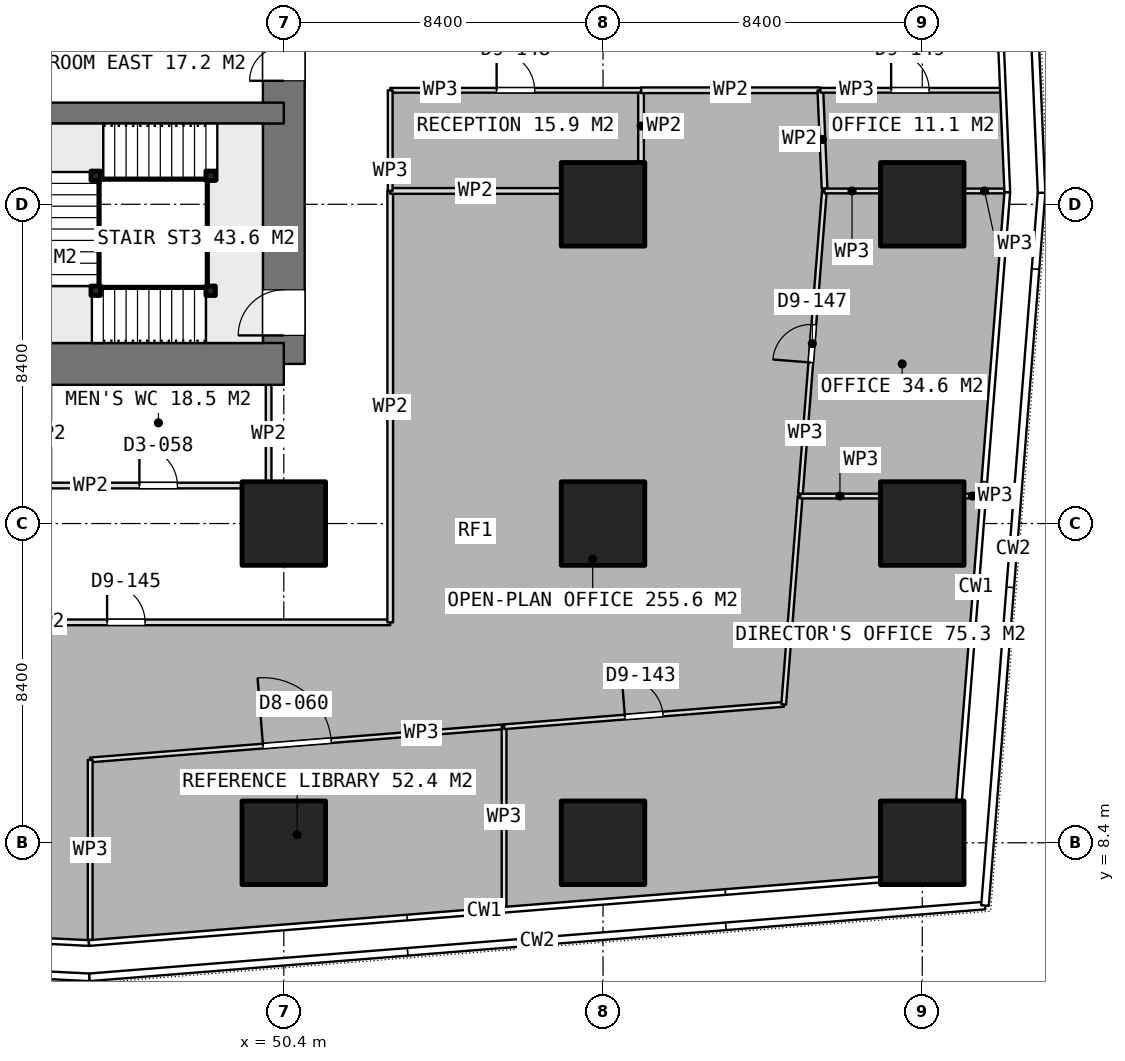
"""IFC4 building model, lengths in metres.
Left out: names, types, materials, properties, quantities, classifications, styles, units other than length and angle.
Written with IfcOpenShell. Run it as: python <this file> out.ifc"""

import sys

from ifc_helpers import new_model, si_unit, direction, frame, frame_2d, origin, origin_2d, place, context, subcontext, project, spatial, rectangle, extrude, element, fill, save


model = new_model("IFC4")
c1 = context("Model", 3, precision=1e-05, world=origin(), true_north=direction((0.0, 1.0)))
c2 = subcontext(c1, "Body", "Model", "MODEL_VIEW")
j1 = project(units=[si_unit("LENGTHUNIT", "METRE"), si_unit("PLANEANGLEUNIT", "RADIAN")], contexts=[c1])
p1 = place(None, origin())
s1 = spatial("IfcSite", under=j1, at=p1, CompositionType="ELEMENT")
p2 = place(p1, origin())
s2 = spatial("IfcBuilding", under=s1, at=p2, CompositionType="ELEMENT")
p3 = place(p2, frame((0.0, 0.0, 51.65)))
s3 = spatial("IfcBuildingStorey", under=s2, at=p3, CompositionType="ELEMENT", Elevation=51.65)
p4 = place(p3, frame((40.0, 21.0, 0.0), z_axis=(0.0, 0.0, 1.0), x_axis=(1.0, 0.0, 0.0)))
e1 = element("IfcWall", 1, at=p4, inside=s3, PredefinedType="SHEAR", context=c2, shape_type="SweptSolid", body=[
    extrude(rectangle(XDim=10.4, YDim=1.1, at=frame_2d((5.2, 0.0))), origin(), (0.0, 0.0, 1.0), 3.75),
])
p5 = place(p3, frame((50.4, 21.0, 0.0), z_axis=(0.0, 0.0, 1.0), x_axis=(0.0, 1.0, 0.0)))
e2 = element("IfcWall", 2, at=p5, inside=s3, PredefinedType="SHEAR", context=c2, shape_type="SweptSolid", body=[
    extrude(rectangle(XDim=25.2, YDim=1.1, at=frame_2d((12.6, 0.0))), origin(), (0.0, 0.0, 1.0), 3.75),
])
p6 = place(p5, frame((16.2, 0.0, 0.0)))
e3 = element("IfcOpeningElement", 3, at=p6, cuts=e2, PredefinedType="OPENING", context=c2, shape_type="SweptSolid", body=[
    extrude(rectangle(XDim=1.2, YDim=2.1, at=frame_2d((0.6, 1.05))), frame((0.0, 0.56, 0.0), z_axis=(0.0, -1.0, 0.0), x_axis=(1.0, 0.0, 0.0)), (0.0, 0.0, 1.0), 1.12),
])
p7 = place(p5, frame((10.05, 0.0, 0.0)))
e4 = element("IfcOpeningElement", 4, at=p7, cuts=e2, PredefinedType="OPENING", context=c2, shape_type="SweptSolid", body=[
    extrude(rectangle(XDim=0.9, YDim=2.1, at=frame_2d((0.45, 1.05))), frame((0.0, 0.56, 0.0), z_axis=(0.0, -1.0, 0.0), x_axis=(1.0, 0.0, 0.0)), (0.0, 0.0, 1.0), 1.12),
])
p8 = place(p5, frame((7.45, 0.0, 0.0)))
e5 = element("IfcOpeningElement", 5, at=p8, cuts=e2, PredefinedType="OPENING", context=c2, shape_type="SweptSolid", body=[
    extrude(rectangle(XDim=0.9, YDim=2.1, at=frame_2d((0.45, 1.05))), frame((0.0, 0.56, 0.0), z_axis=(0.0, -1.0, 0.0), x_axis=(1.0, 0.0, 0.0)), (0.0, 0.0, 1.0), 1.12),
])
p9 = place(p5, frame((0.75, 0.0, 0.0)))
e6 = element("IfcOpeningElement", 6, at=p9, cuts=e2, PredefinedType="OPENING", context=c2, shape_type="SweptSolid", body=[
    extrude(rectangle(XDim=1.2, YDim=2.1, at=frame_2d((0.6, 1.05))), frame((0.0, 0.56, 0.0), z_axis=(0.0, -1.0, 0.0), x_axis=(1.0, 0.0, 0.0)), (0.0, 0.0, 1.0), 1.12),
])
p10 = place(p3, frame((43.8, 27.6, 0.0), z_axis=(0.0, 0.0, 1.0), x_axis=(1.0, 0.0, 0.0)))
e7 = element("IfcWall", 7, at=p10, inside=s3, PredefinedType="SHEAR", context=c2, shape_type="SweptSolid", body=[
    extrude(rectangle(XDim=6.6, YDim=0.55, at=frame_2d((3.3, 0.0))), origin(), (0.0, 0.0, 1.0), 3.75),
])
for number, where, z_axis, x_axis in (
    (8, (50.4, 8.4, 0.0), (0.0, 0.0, 1.0), (1.0, 0.0, 0.0)),
    (9, (50.4, 16.8, 0.0), (0.0, 0.0, 1.0), (1.0, 0.0, 0.0)),
    (10, (58.8, 8.4, 0.0), (0.0, 0.0, 1.0), (1.0, 0.0, 0.0)),
    (11, (58.8, 16.8, 0.0), (0.0, 0.0, 1.0), (1.0, 0.0, 0.0)),
    (12, (58.8, 25.2, 0.0), (0.0, 0.0, 1.0), (1.0, 0.0, 0.0)),
    (13, (67.2, 8.4, 0.0), (0.0, 0.0, 1.0), (1.0, 0.0, 0.0)),
    (14, (67.2, 16.8, 0.0), (0.0, 0.0, 1.0), (1.0, 0.0, 0.0)),
    (15, (67.2, 25.2, 0.0), (0.0, 0.0, 1.0), (1.0, 0.0, 0.0)),
):
    element("IfcColumn", number, at=place(p3, frame(where, z_axis=z_axis, x_axis=x_axis)), inside=s3, PredefinedType="COLUMN", context=c2, shape_type="SweptSolid", body=[
        extrude(rectangle(XDim=2.2, YDim=2.2, at=origin_2d()), origin(), (0.0, 0.0, 1.0), 3.75),
    ])
p11 = place(p3, frame((44.125, 17.8, 0.0), z_axis=(0.0, 0.0, 1.0), x_axis=(1.0, 0.0, 0.0)))
e16 = element("IfcWall", 16, at=p11, inside=s3, PredefinedType="PARTITIONING", context=c2, shape_type="SweptSolid", body=[
    extrude(rectangle(XDim=5.95, YDim=0.15, at=frame_2d((2.975, 0.0))), origin(), (0.0, 0.0, 1.0), 3.5),
])
p12 = place(p11, frame((2.475, 0.0, 0.0)))
e17 = element("IfcOpeningElement", 17, at=p12, cuts=e16, PredefinedType="OPENING", context=c2, shape_type="SweptSolid", body=[
    extrude(rectangle(XDim=1.0, YDim=2.1, at=frame_2d((0.5, 1.05))), frame((0.0, 0.085, 0.0), z_axis=(0.0, -1.0, 0.0), x_axis=(1.0, 0.0, 0.0)), (0.0, 0.0, 1.0), 0.17),
])
p13 = place(p3, frame((50.0, 17.875, 0.0), z_axis=(0.0, 0.0, 1.0), x_axis=(0.0, 1.0, 0.0)))
e18 = element("IfcWall", 18, at=p13, inside=s3, PredefinedType="PARTITIONING", context=c2, shape_type="SweptSolid", body=[
    extrude(rectangle(XDim=2.575, YDim=0.15, at=frame_2d((1.288, 0.0))), origin(), (0.0, 0.0, 1.0), 3.5),
])
p14 = place(p3, frame((45.305, 10.58, 0.0), z_axis=(0.0, 0.0, 1.0), x_axis=(0.99680425646, 0.079882878656, 0.0)))
e19 = element("IfcWall", 19, at=p14, inside=s3, PredefinedType="PARTITIONING", context=c2, shape_type="SweptSolid", body=[
    extrude(rectangle(XDim=10.926, YDim=0.125, at=frame_2d((5.463, 0.0))), origin(), (0.0, 0.0, 1.0), 3.5),
])
p15 = place(p14, frame((4.563, 0.0, 0.0)))
e20 = element("IfcOpeningElement", 20, at=p15, cuts=e19, PredefinedType="OPENING", context=c2, shape_type="SweptSolid", body=[
    extrude(rectangle(XDim=1.8, YDim=2.1, at=frame_2d((0.9, 1.05))), frame((0.0, 0.073, 0.0), z_axis=(0.0, -1.0, 0.0), x_axis=(1.0, 0.0, 0.0)), (0.0, 0.0, 1.0), 0.145),
])
p16 = place(p3, frame((56.196, 11.453, 0.0), z_axis=(0.0, 0.0, 1.0), x_axis=(0.0, -1.0, 0.0)))
e21 = element("IfcWall", 21, at=p16, inside=s3, PredefinedType="PARTITIONING", context=c2, shape_type="SweptSolid", body=[
    extrude(rectangle(XDim=4.736, YDim=0.125, at=frame_2d((2.368, 0.0))), origin(), (0.0, 0.0, 1.0), 3.5),
])
p17 = place(p3, frame((45.305, 5.845, 0.0), z_axis=(0.0, 0.0, 1.0), x_axis=(0.0, 1.0, 0.0)))
e22 = element("IfcWall", 22, at=p17, inside=s3, PredefinedType="PARTITIONING", context=c2, shape_type="SweptSolid", body=[
    extrude(rectangle(XDim=4.735, YDim=0.125, at=frame_2d((2.368, 0.0))), origin(), (0.0, 0.0, 1.0), 3.5),
])
p18 = place(p3, frame((56.197, 11.453, 0.0), z_axis=(0.0, 0.0, 1.0), x_axis=(0.996809280439, 0.079820163062, 0.0)))
e23 = element("IfcWall", 23, at=p18, inside=s3, PredefinedType="PARTITIONING", context=c2, shape_type="SweptSolid", body=[
    extrude(rectangle(XDim=7.38, YDim=0.125, at=frame_2d((3.69, 0.0))), origin(), (0.0, 0.0, 1.0), 3.5),
])
p19 = place(p18, frame((3.19, 0.0, 0.0)))
e24 = element("IfcOpeningElement", 24, at=p19, cuts=e23, PredefinedType="OPENING", context=c2, shape_type="SweptSolid", body=[
    extrude(rectangle(XDim=1.0, YDim=2.1, at=frame_2d((0.5, 1.05))), frame((0.0, 0.073, 0.0), z_axis=(0.0, -1.0, 0.0), x_axis=(1.0, 0.0, 0.0)), (0.0, 0.0, 1.0), 0.145),
])
p20 = place(p3, frame((63.554, 12.042, 0.0), z_axis=(0.0, 0.0, 1.0), x_axis=(0.078951000854, 0.996878497844, 0.0)))
e25 = element("IfcWall", 25, at=p20, inside=s3, PredefinedType="PARTITIONING", context=c2, shape_type="SweptSolid", body=[
    extrude(rectangle(XDim=5.498, YDim=0.125, at=frame_2d((2.749, 0.0))), origin(), (0.0, 0.0, 1.0), 3.5),
])
p21 = place(p3, frame((63.988, 17.523, 0.0), z_axis=(0.0, 0.0, 1.0), x_axis=(1.0, 0.0, 0.0)))
e26 = element("IfcWall", 26, at=p21, inside=s3, PredefinedType="PARTITIONING", context=c2, shape_type="SweptSolid", body=[
    extrude(rectangle(XDim=2.092, YDim=0.125, at=frame_2d((1.046, 0.0))), origin(), (0.0, 0.0, 1.0), 3.5),
])
p22 = place(p3, frame((68.32, 17.523, 0.0), z_axis=(0.0, 0.0, 1.0), x_axis=(1.0, 0.0, 0.0)))
e27 = element("IfcWall", 27, at=p22, inside=s3, PredefinedType="PARTITIONING", context=c2, shape_type="SweptSolid", body=[
    extrude(rectangle(XDim=0.403, YDim=0.125, at=frame_2d((0.201, 0.0))), origin(), (0.0, 0.0, 1.0), 3.5),
])
p23 = place(p3, frame((63.994, 17.585, 0.0), z_axis=(0.0, 0.0, 1.0), x_axis=(0.07897654499, 0.996876474465, 0.0)))
e28 = element("IfcWall", 28, at=p23, inside=s3, PredefinedType="PARTITIONING", context=c2, shape_type="SweptSolid", body=[
    extrude(rectangle(XDim=7.991, YDim=0.125, at=frame_2d((3.996, 0.0))), origin(), (0.0, 0.0, 1.0), 3.5),
])
p24 = place(p23, frame((3.463, 0.0, 0.0)))
e29 = element("IfcOpeningElement", 29, at=p24, cuts=e28, PredefinedType="OPENING", context=c2, shape_type="SweptSolid", body=[
    extrude(rectangle(XDim=1.0, YDim=2.1, at=frame_2d((0.5, 1.05))), frame((0.0, 0.073, 0.0), z_axis=(0.0, -1.0, 0.0), x_axis=(1.0, 0.0, 0.0)), (0.0, 0.0, 1.0), 0.145),
])
p25 = place(p3, frame((64.625, 25.551, 0.0), z_axis=(0.0, 0.0, 1.0), x_axis=(1.0, 0.0, 0.0)))
e30 = element("IfcWall", 30, at=p25, inside=s3, PredefinedType="PARTITIONING", context=c2, shape_type="SweptSolid", body=[
    extrude(rectangle(XDim=1.455, YDim=0.125, at=frame_2d((0.728, 0.0))), origin(), (0.0, 0.0, 1.0), 3.5),
])
p26 = place(p3, frame((68.32, 25.551, 0.0), z_axis=(0.0, 0.0, 1.0), x_axis=(1.0, 0.0, 0.0)))
e31 = element("IfcWall", 31, at=p26, inside=s3, PredefinedType="PARTITIONING", context=c2, shape_type="SweptSolid", body=[
    extrude(rectangle(XDim=1.037, YDim=0.125, at=frame_2d((0.519, 0.0))), origin(), (0.0, 0.0, 1.0), 3.5),
])
p27 = place(p3, frame((39.3, 14.2, 0.0), z_axis=(0.0, 0.0, 1.0), x_axis=(1.0, 0.0, 0.0)))
e32 = element("IfcWall", 32, at=p27, inside=s3, PredefinedType="PARTITIONING", context=c2, shape_type="SweptSolid", body=[
    extrude(rectangle(XDim=13.9, YDim=0.15, at=frame_2d((6.95, 0.0))), origin(), (0.0, 0.0, 1.0), 3.5),
])
p28 = place(p27, frame((6.45, 0.0, 0.0)))
e33 = element("IfcOpeningElement", 33, at=p28, cuts=e32, PredefinedType="OPENING", context=c2, shape_type="SweptSolid", body=[
    extrude(rectangle(XDim=1.0, YDim=2.1, at=frame_2d((0.5, 1.05))), frame((0.0, 0.085, 0.0), z_axis=(0.0, -1.0, 0.0), x_axis=(1.0, 0.0, 0.0)), (0.0, 0.0, 1.0), 0.17),
])
p29 = place(p3, frame((53.2, 14.2, 0.0), z_axis=(0.0, 0.0, 1.0), x_axis=(0.0, 1.0, 0.0)))
e34 = element("IfcWall", 34, at=p29, inside=s3, PredefinedType="PARTITIONING", context=c2, shape_type="SweptSolid", body=[
    extrude(rectangle(XDim=11.352, YDim=0.15, at=frame_2d((5.676, 0.0))), origin(), (0.0, 0.0, 1.0), 3.5),
])
p30 = place(p3, frame((53.2, 25.552, 0.0), z_axis=(0.0, 0.0, 1.0), x_axis=(1.0, 0.0, 0.0)))
e35 = element("IfcWall", 35, at=p30, inside=s3, PredefinedType="PARTITIONING", context=c2, shape_type="SweptSolid", body=[
    extrude(rectangle(XDim=4.48, YDim=0.15, at=frame_2d((2.24, 0.0))), origin(), (0.0, 0.0, 1.0), 3.5),
])
p31 = place(p3, frame((59.8, 26.32, 0.0), z_axis=(0.0, 0.0, 1.0), x_axis=(0.0, 1.0, 0.0)))
e36 = element("IfcWall", 36, at=p31, inside=s3, PredefinedType="PARTITIONING", context=c2, shape_type="SweptSolid", body=[
    extrude(rectangle(XDim=1.88, YDim=0.15, at=frame_2d((0.94, 0.0))), origin(), (0.0, 0.0, 1.0), 3.5),
])
p32 = place(p3, frame((59.8, 28.2, 0.0), z_axis=(0.0, 0.0, 1.0), x_axis=(1.0, 0.0, 0.0)))
e37 = element("IfcWall", 37, at=p32, inside=s3, PredefinedType="PARTITIONING", context=c2, shape_type="SweptSolid", body=[
    extrude(rectangle(XDim=4.719, YDim=0.15, at=frame_2d((2.359, 0.0))), origin(), (0.0, 0.0, 1.0), 3.5),
])
p33 = place(p3, frame((64.519, 28.2, 0.0), z_axis=(0.0, 0.0, 1.0), x_axis=(0.042430609407, -0.999099416167, 0.0)))
e38 = element("IfcWall", 38, at=p33, inside=s3, PredefinedType="PARTITIONING", context=c2, shape_type="SweptSolid", body=[
    extrude(rectangle(XDim=2.589, YDim=0.15, at=frame_2d((1.295, 0.0))), origin(), (0.0, 0.0, 1.0), 3.5),
])
p34 = place(p3, frame((64.519, 28.2, 0.0), z_axis=(0.0, 0.0, 1.0), x_axis=(1.0, 0.0, 0.0)))
e39 = element("IfcWall", 39, at=p34, inside=s3, PredefinedType="PARTITIONING", context=c2, shape_type="SweptSolid", body=[
    extrude(rectangle(XDim=4.755, YDim=0.125, at=frame_2d((2.377, 0.0))), origin(), (0.0, 0.0, 1.0), 3.5),
])
p35 = place(p34, frame((1.862, 0.0, 0.0)))
e40 = element("IfcOpeningElement", 40, at=p35, cuts=e39, PredefinedType="OPENING", context=c2, shape_type="SweptSolid", body=[
    extrude(rectangle(XDim=1.0, YDim=2.1, at=frame_2d((0.5, 1.05))), frame((0.0, 0.073, 0.0), z_axis=(0.0, -1.0, 0.0), x_axis=(1.0, 0.0, 0.0)), (0.0, 0.0, 1.0), 0.145),
])
p36 = place(p3, frame((53.2, 28.2, 0.0), z_axis=(0.0, 0.0, 1.0), x_axis=(1.0, 0.0, 0.0)))
e41 = element("IfcWall", 41, at=p36, inside=s3, PredefinedType="PARTITIONING", context=c2, shape_type="SweptSolid", body=[
    extrude(rectangle(XDim=6.6, YDim=0.125, at=frame_2d((3.3, 0.0))), origin(), (0.0, 0.0, 1.0), 3.5),
])
p37 = place(p36, frame((2.8, 0.0, 0.0)))
e42 = element("IfcOpeningElement", 42, at=p37, cuts=e41, PredefinedType="OPENING", context=c2, shape_type="SweptSolid", body=[
    extrude(rectangle(XDim=1.0, YDim=2.1, at=frame_2d((0.5, 1.05))), frame((0.0, 0.073, 0.0), z_axis=(0.0, -1.0, 0.0), x_axis=(1.0, 0.0, 0.0)), (0.0, 0.0, 1.0), 0.145),
])
p38 = place(p3, frame((53.2, 25.552, 0.0), z_axis=(0.0, 0.0, 1.0), x_axis=(0.0, 1.0, 0.0)))
e43 = element("IfcWall", 43, at=p38, inside=s3, PredefinedType="PARTITIONING", context=c2, shape_type="SweptSolid", body=[
    extrude(rectangle(XDim=2.648, YDim=0.125, at=frame_2d((1.324, 0.0))), origin(), (0.0, 0.0, 1.0), 3.5),
])
for number, where, z_axis, x_axis in (
    (44, (48.475, 22.925, 0.0), (0.0, 0.0, 1.0), (1.0, 0.0, 0.0)),
    (45, (45.45, 22.925, 0.0), (0.0, 0.0, 1.0), (1.0, 0.0, 0.0)),
    (46, (45.45, 25.95, 0.0), (0.0, 0.0, 1.0), (1.0, 0.0, 0.0)),
    (47, (48.475, 25.95, 0.0), (0.0, 0.0, 1.0), (1.0, 0.0, 0.0)),
):
    element("IfcColumn", number, at=place(p3, frame(where, z_axis=z_axis, x_axis=x_axis)), inside=s3, PredefinedType="COLUMN", context=c2, shape_type="SweptSolid", body=[
        extrude(rectangle(XDim=0.25, YDim=0.25, at=origin_2d()), origin(), (0.0, 0.0, 1.0), 3.75),
    ])
p39 = place(p8, origin())
e48 = element("IfcDoor", 48, at=p39, inside=s3, OperationType="SINGLE_SWING_LEFT", PredefinedType="DOOR", context=c2, shape_type="SweptSolid", body=[
    extrude(rectangle(XDim=0.9, YDim=2.1, at=frame_2d((0.45, 1.05))), frame((0.0, 0.025, 0.0), z_axis=(0.0, -1.0, 0.0), x_axis=(1.0, 0.0, 0.0)), (0.0, 0.0, 1.0), 0.05),
])
fill(e5, e48)
p40 = place(p12, origin())
e49 = element("IfcDoor", 49, at=p40, inside=s3, OperationType="SINGLE_SWING_LEFT", PredefinedType="DOOR", context=c2, shape_type="SweptSolid", body=[
    extrude(rectangle(XDim=1.0, YDim=2.1, at=frame_2d((0.5, 1.05))), frame((0.0, 0.025, 0.0), z_axis=(0.0, -1.0, 0.0), x_axis=(1.0, 0.0, 0.0)), (0.0, 0.0, 1.0), 0.05),
])
fill(e17, e49)
p41 = place(p15, origin())
e50 = element("IfcDoor", 50, at=p41, inside=s3, OperationType="DOUBLE_DOOR_SINGLE_SWING", PredefinedType="DOOR", context=c2, shape_type="SweptSolid", body=[
    extrude(rectangle(XDim=1.8, YDim=2.1, at=frame_2d((0.9, 1.05))), frame((0.0, 0.025, 0.0), z_axis=(0.0, -1.0, 0.0), x_axis=(1.0, 0.0, 0.0)), (0.0, 0.0, 1.0), 0.05),
])
fill(e20, e50)
p42 = place(p19, origin())
e51 = element("IfcDoor", 51, at=p42, inside=s3, OperationType="SINGLE_SWING_LEFT", PredefinedType="DOOR", context=c2, shape_type="SweptSolid", body=[
    extrude(rectangle(XDim=1.0, YDim=2.1, at=frame_2d((0.5, 1.05))), frame((0.0, 0.025, 0.0), z_axis=(0.0, -1.0, 0.0), x_axis=(1.0, 0.0, 0.0)), (0.0, 0.0, 1.0), 0.05),
])
fill(e24, e51)
p43 = place(p24, origin())
e52 = element("IfcDoor", 52, at=p43, inside=s3, OperationType="SINGLE_SWING_LEFT", PredefinedType="DOOR", context=c2, shape_type="SweptSolid", body=[
    extrude(rectangle(XDim=1.0, YDim=2.1, at=frame_2d((0.5, 1.05))), frame((0.0, 0.025, 0.0), z_axis=(0.0, -1.0, 0.0), x_axis=(1.0, 0.0, 0.0)), (0.0, 0.0, 1.0), 0.05),
])
fill(e29, e52)
p44 = place(p28, origin())
e53 = element("IfcDoor", 53, at=p44, inside=s3, OperationType="SINGLE_SWING_LEFT", PredefinedType="DOOR", context=c2, shape_type="SweptSolid", body=[
    extrude(rectangle(XDim=1.0, YDim=2.1, at=frame_2d((0.5, 1.05))), frame((0.0, 0.025, 0.0), z_axis=(0.0, -1.0, 0.0), x_axis=(1.0, 0.0, 0.0)), (0.0, 0.0, 1.0), 0.05),
])
fill(e33, e53)
p45 = place(p35, origin())
e54 = element("IfcDoor", 54, at=p45, inside=s3, OperationType="SINGLE_SWING_LEFT", PredefinedType="DOOR", context=c2, shape_type="SweptSolid", body=[
    extrude(rectangle(XDim=1.0, YDim=2.1, at=frame_2d((0.5, 1.05))), frame((0.0, 0.025, 0.0), z_axis=(0.0, -1.0, 0.0), x_axis=(1.0, 0.0, 0.0)), (0.0, 0.0, 1.0), 0.05),
])
fill(e40, e54)
p46 = place(p37, origin())
e55 = element("IfcDoor", 55, at=p46, inside=s3, OperationType="SINGLE_SWING_LEFT", PredefinedType="DOOR", context=c2, shape_type="SweptSolid", body=[
    extrude(rectangle(XDim=1.0, YDim=2.1, at=frame_2d((0.5, 1.05))), frame((0.0, 0.025, 0.0), z_axis=(0.0, -1.0, 0.0), x_axis=(1.0, 0.0, 0.0)), (0.0, 0.0, 1.0), 0.05),
])
fill(e42, e55)
p47 = place(p9, origin())
e56 = element("IfcDoor", 56, at=p47, inside=s3, OperationType="SINGLE_SWING_RIGHT", PredefinedType="DOOR", context=c2, shape_type="SweptSolid", body=[
    extrude(rectangle(XDim=1.2, YDim=2.1, at=frame_2d((0.6, 1.05))), frame((0.0, 0.025, 0.0), z_axis=(0.0, -1.0, 0.0), x_axis=(1.0, 0.0, 0.0)), (0.0, 0.0, 1.0), 0.05),
])
fill(e6, e56)
save(model, sys.argv[1])
